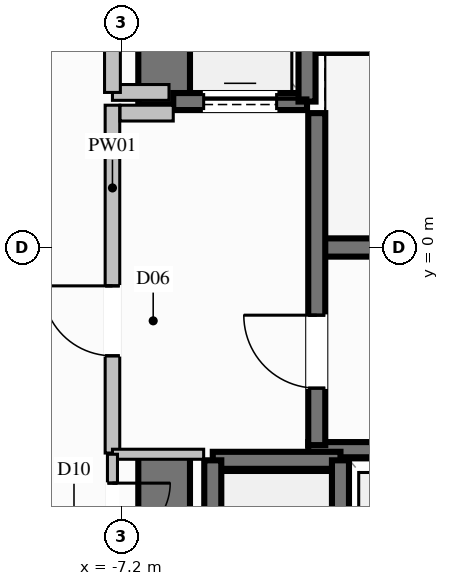
"""IFC4 building model, lengths in metres.
Left out: names, types, materials, properties, quantities, classifications, styles, units other than length and angle.
Written with IfcOpenShell. Run it as: python <this file> out.ifc"""

import sys

from ifc_helpers import new_model, si_unit, direction, frame, frame_2d, origin, place, context, subcontext, project, spatial, rectangle, extrude, element, fill, save


model = new_model("IFC4")
c1 = context("Model", 3, precision=1e-05, world=origin(), true_north=direction((0.0, 1.0)))
c2 = subcontext(c1, "Body", "Model", "MODEL_VIEW")
j1 = project(units=[si_unit("LENGTHUNIT", "METRE"), si_unit("PLANEANGLEUNIT", "RADIAN")], contexts=[c1])
p1 = place(None, origin())
s1 = spatial("IfcSite", under=j1, at=p1, CompositionType="ELEMENT")
p2 = place(p1, origin())
s2 = spatial("IfcBuilding", under=s1, at=p2, CompositionType="ELEMENT")
p3 = place(p2, frame((0.0, 0.0, 12.6)))
s3 = spatial("IfcBuildingStorey", under=s2, at=p3, CompositionType="ELEMENT", Elevation=12.6)
p4 = place(p3, frame((-3.99, 0.0, 0.0), z_axis=(0.0, 0.0, 1.0), x_axis=(1.0, 0.0, 0.0)))
e1 = element("IfcWall", 1, at=p4, inside=s3, PredefinedType="SHEAR", context=c2, shape_type="SweptSolid", body=[
    extrude(rectangle(XDim=7.98, YDim=0.3, at=frame_2d((3.99, 0.0))), origin(), (0.0, 0.0, 1.0), 6.0),
])
for number, where, z_axis, x_axis in (
    (2, (-4.13, -3.325, 0.0), (0.0, 0.0, 1.0), (1.0, 0.0, 0.0)),
    (3, (-4.13, 3.325, 0.0), (0.0, 0.0, 1.0), (1.0, 0.0, 0.0)),
):
    element("IfcWall", number, at=place(p3, frame(where, z_axis=z_axis, x_axis=x_axis)), inside=s3, PredefinedType="SOLIDWALL", context=c2, shape_type="SweptSolid", body=[
        extrude(rectangle(XDim=8.26, YDim=0.25, at=frame_2d((4.13, 0.0))), origin(), (0.0, 0.0, 1.0), 6.0),
    ])
p5 = place(p3, frame((-6.5, 2.35, 0.0), z_axis=(0.0, 0.0, 1.0), x_axis=(0.0, 1.0, 0.0)))
e4 = element("IfcWall", 4, at=p5, inside=s3, PredefinedType="SHEAR", context=c2, shape_type="SweptSolid", body=[
    extrude(rectangle(XDim=4.175, YDim=0.85, at=frame_2d((2.087, 0.0))), origin(), (0.0, 0.0, 1.0), 6.0),
])
p6 = place(p3, frame((-6.5, -6.525, 0.0), z_axis=(0.0, 0.0, 1.0), x_axis=(0.0, 1.0, 0.0)))
e5 = element("IfcWall", 5, at=p6, inside=s3, PredefinedType="SHEAR", context=c2, shape_type="SweptSolid", body=[
    extrude(rectangle(XDim=3.175, YDim=0.85, at=frame_2d((1.587, 0.0))), origin(), (0.0, 0.0, 1.0), 6.0),
])
p7 = place(p3, frame((-3.6, -3.5, 0.0), z_axis=(0.0, 0.0, 1.0), x_axis=(-1.0, 0.0, 0.0)))
e6 = element("IfcWall", 6, at=p7, inside=s3, PredefinedType="SOLIDWALL", context=c2, shape_type="SweptSolid", body=[
    extrude(rectangle(XDim=2.1, YDim=0.28, at=frame_2d((1.05, 0.0))), origin(), (0.0, 0.0, 1.0), 5.64),
])
for number, where, z_axis, x_axis in (
    (7, (-5.7, -3.5, 0.0), (0.0, 0.0, 1.0), (0.0, -1.0, 0.0)),
    (8, (-3.6, -6.0, 0.0), (0.0, 0.0, 1.0), (0.0, 1.0, 0.0)),
):
    element("IfcWall", number, at=place(p3, frame(where, z_axis=z_axis, x_axis=x_axis)), inside=s3, PredefinedType="SOLIDWALL", context=c2, shape_type="SweptSolid", body=[
        extrude(rectangle(XDim=2.5, YDim=0.28, at=frame_2d((1.25, 0.0))), origin(), (0.0, 0.0, 1.0), 5.64),
    ])
p8 = place(p3, frame((-6.35, 2.4, 0.0), z_axis=(0.0, 0.0, 1.0), x_axis=(1.0, 0.0, 0.0)))
e9 = element("IfcWall", 9, at=p8, inside=s3, PredefinedType="SOLIDWALL", context=c2, shape_type="SweptSolid", body=[
    extrude(rectangle(XDim=2.2, YDim=0.28, at=frame_2d((1.1, 0.0))), origin(), (0.0, 0.0, 1.0), 5.64),
])
p9 = place(p8, frame((0.5, 0.0, 0.0)))
e10 = element("IfcOpeningElement", 10, at=p9, cuts=e9, PredefinedType="OPENING", context=c2, shape_type="SweptSolid", body=[
    extrude(rectangle(XDim=1.2, YDim=2.2, at=frame_2d((0.6, 1.1))), frame((0.0, 0.15, 0.0), z_axis=(0.0, -1.0, 0.0), x_axis=(1.0, 0.0, 0.0)), (0.0, 0.0, 1.0), 0.3),
])
p10 = place(p3, frame((-4.15, 2.4, 0.0), z_axis=(0.0, 0.0, 1.0), x_axis=(0.0, 1.0, 0.0)))
e11 = element("IfcWall", 11, at=p10, inside=s3, PredefinedType="SOLIDWALL", context=c2, shape_type="SweptSolid", body=[
    extrude(rectangle(XDim=2.7, YDim=0.28, at=frame_2d((1.35, 0.0))), origin(), (0.0, 0.0, 1.0), 5.64),
])
p11 = place(p3, frame((-3.99, -3.25, 0.0), z_axis=(0.0, 0.0, 1.0), x_axis=(0.0, 1.0, 0.0)))
e12 = element("IfcWall", 12, at=p11, inside=s3, PredefinedType="SOLIDWALL", context=c2, shape_type="SweptSolid", body=[
    extrude(rectangle(XDim=5.46, YDim=0.28, at=frame_2d((2.73, 0.0))), origin(), (0.0, 0.0, 1.0), 5.64),
])
p12 = place(p11, frame((0.937, 0.0, 0.0)))
e13 = element("IfcOpeningElement", 13, at=p12, cuts=e12, PredefinedType="OPENING", context=c2, shape_type="SweptSolid", body=[
    extrude(rectangle(XDim=1.2, YDim=2.2, at=frame_2d((0.6, 1.1))), frame((0.0, 0.15, 0.0), z_axis=(0.0, -1.0, 0.0), x_axis=(1.0, 0.0, 0.0)), (0.0, 0.0, 1.0), 0.3),
])
p13 = place(p3, frame((-7.35, -3.38, 0.0), z_axis=(0.0, 0.0, 1.0), x_axis=(0.0, 1.0, 0.0)))
e14 = element("IfcWall", 14, at=p13, inside=s3, PredefinedType="PARTITIONING", context=c2, shape_type="SweptSolid", body=[
    extrude(rectangle(XDim=5.72, YDim=0.24, at=frame_2d((2.86, 0.0))), origin(), (0.0, 0.0, 1.0), 4.525),
])
p14 = place(p13, frame((1.599, 0.0, 0.0)))
e15 = element("IfcOpeningElement", 15, at=p14, cuts=e14, PredefinedType="OPENING", context=c2, shape_type="SweptSolid", body=[
    extrude(rectangle(XDim=1.15, YDim=2.2, at=frame_2d((0.575, 1.1))), frame((0.0, 0.13, 0.0), z_axis=(0.0, -1.0, 0.0), x_axis=(1.0, 0.0, 0.0)), (0.0, 0.0, 1.0), 0.26),
])
p15 = place(p3, frame((-7.225, 2.21, 0.0), z_axis=(0.0, 0.0, 1.0), x_axis=(1.0, 0.0, 0.0)))
e16 = element("IfcWall", 16, at=p15, inside=s3, PredefinedType="PARTITIONING", context=c2, shape_type="SweptSolid", body=[
    extrude(rectangle(XDim=0.875, YDim=0.26, at=frame_2d((0.438, 0.0))), origin(), (0.0, 0.0, 1.0), 5.64),
])
p16 = place(p3, frame((-7.35, 2.55, 0.0), z_axis=(0.0, 0.0, 1.0), x_axis=(1.0, 0.0, 0.0)))
e17 = element("IfcWall", 17, at=p16, inside=s3, PredefinedType="PARTITIONING", context=c2, shape_type="SweptSolid", body=[
    extrude(rectangle(XDim=0.93, YDim=0.26, at=frame_2d((0.465, 0.0))), origin(), (0.0, 0.0, 1.0), 5.64),
])
p17 = place(p3, frame((-7.35, 2.55, 0.0), z_axis=(0.0, 0.0, 1.0), x_axis=(0.0, 1.0, 0.0)))
e18 = element("IfcWall", 18, at=p17, inside=s3, PredefinedType="PARTITIONING", context=c2, shape_type="SweptSolid", body=[
    extrude(rectangle(XDim=2.4, YDim=0.26, at=frame_2d((1.2, 0.0))), origin(), (0.0, 0.0, 1.0), 4.525),
])
p18 = place(p17, frame((0.775, 0.0, 0.0)))
e19 = element("IfcOpeningElement", 19, at=p18, cuts=e18, PredefinedType="OPENING", context=c2, shape_type="SweptSolid", body=[
    extrude(rectangle(XDim=0.85, YDim=2.05, at=frame_2d((0.425, 1.025))), frame((0.0, 0.14, 0.0), z_axis=(0.0, -1.0, 0.0), x_axis=(1.0, 0.0, 0.0)), (0.0, 0.0, 1.0), 0.28),
])
p19 = place(p3, frame((-5.85, -3.4, 0.0), z_axis=(0.0, 0.0, 1.0), x_axis=(-1.0, 0.0, 0.0)))
e20 = element("IfcWall", 20, at=p19, inside=s3, PredefinedType="PARTITIONING", context=c2, shape_type="SweptSolid", body=[
    extrude(rectangle(XDim=1.5, YDim=0.165, at=frame_2d((0.75, 0.0))), origin(), (0.0, 0.0, 1.0), 5.64),
])
p20 = place(p3, frame((-7.35, -3.4, 0.0), z_axis=(0.0, 0.0, 1.0), x_axis=(0.0, -1.0, 0.0)))
e21 = element("IfcWall", 21, at=p20, inside=s3, PredefinedType="PARTITIONING", context=c2, shape_type="SweptSolid", body=[
    extrude(rectangle(XDim=1.9, YDim=0.165, at=frame_2d((0.95, 0.0))), origin(), (0.0, 0.0, 1.0), 4.525),
])
p21 = place(p20, frame((0.475, 0.0, 0.0)))
e22 = element("IfcOpeningElement", 22, at=p21, cuts=e21, PredefinedType="OPENING", context=c2, shape_type="SweptSolid", body=[
    extrude(rectangle(XDim=0.95, YDim=2.1, at=frame_2d((0.475, 1.05))), frame((0.0, 0.093, 0.0), z_axis=(0.0, -1.0, 0.0), x_axis=(1.0, 0.0, 0.0)), (0.0, 0.0, 1.0), 0.185),
])
p22 = place(p9, origin())
e23 = element("IfcDoor", 23, at=p22, inside=s3, OperationType="SLIDING_TO_LEFT", PredefinedType="DOOR", context=c2, shape_type="SweptSolid", body=[
    extrude(rectangle(XDim=1.2, YDim=2.2, at=frame_2d((0.6, 1.1))), frame((0.0, 0.025, 0.0), z_axis=(0.0, -1.0, 0.0), x_axis=(1.0, 0.0, 0.0)), (0.0, 0.0, 1.0), 0.05),
])
fill(e10, e23)
p23 = place(p12, origin())
e24 = element("IfcDoor", 24, at=p23, inside=s3, OperationType="SINGLE_SWING_RIGHT", PredefinedType="DOOR", context=c2, shape_type="SweptSolid", body=[
    extrude(rectangle(XDim=1.2, YDim=2.2, at=frame_2d((0.6, 1.1))), frame((0.0, 0.025, 0.0), z_axis=(0.0, -1.0, 0.0), x_axis=(1.0, 0.0, 0.0)), (0.0, 0.0, 1.0), 0.05),
])
fill(e13, e24)
p24 = place(p14, origin())
e25 = element("IfcDoor", 25, at=p24, inside=s3, OperationType="SINGLE_SWING_RIGHT", PredefinedType="DOOR", context=c2, shape_type="SweptSolid", body=[
    extrude(rectangle(XDim=1.15, YDim=2.2, at=frame_2d((0.575, 1.1))), frame((0.0, 0.025, 0.0), z_axis=(0.0, -1.0, 0.0), x_axis=(1.0, 0.0, 0.0)), (0.0, 0.0, 1.0), 0.05),
])
fill(e15, e25)
p25 = place(p21, origin())
e26 = element("IfcDoor", 26, at=p25, inside=s3, OperationType="SINGLE_SWING_LEFT", PredefinedType="DOOR", context=c2, shape_type="SweptSolid", body=[
    extrude(rectangle(XDim=0.95, YDim=2.1, at=frame_2d((0.475, 1.05))), frame((0.0, 0.025, 0.0), z_axis=(0.0, -1.0, 0.0), x_axis=(1.0, 0.0, 0.0)), (0.0, 0.0, 1.0), 0.05),
])
fill(e22, e26)
save(model, sys.argv[1])
